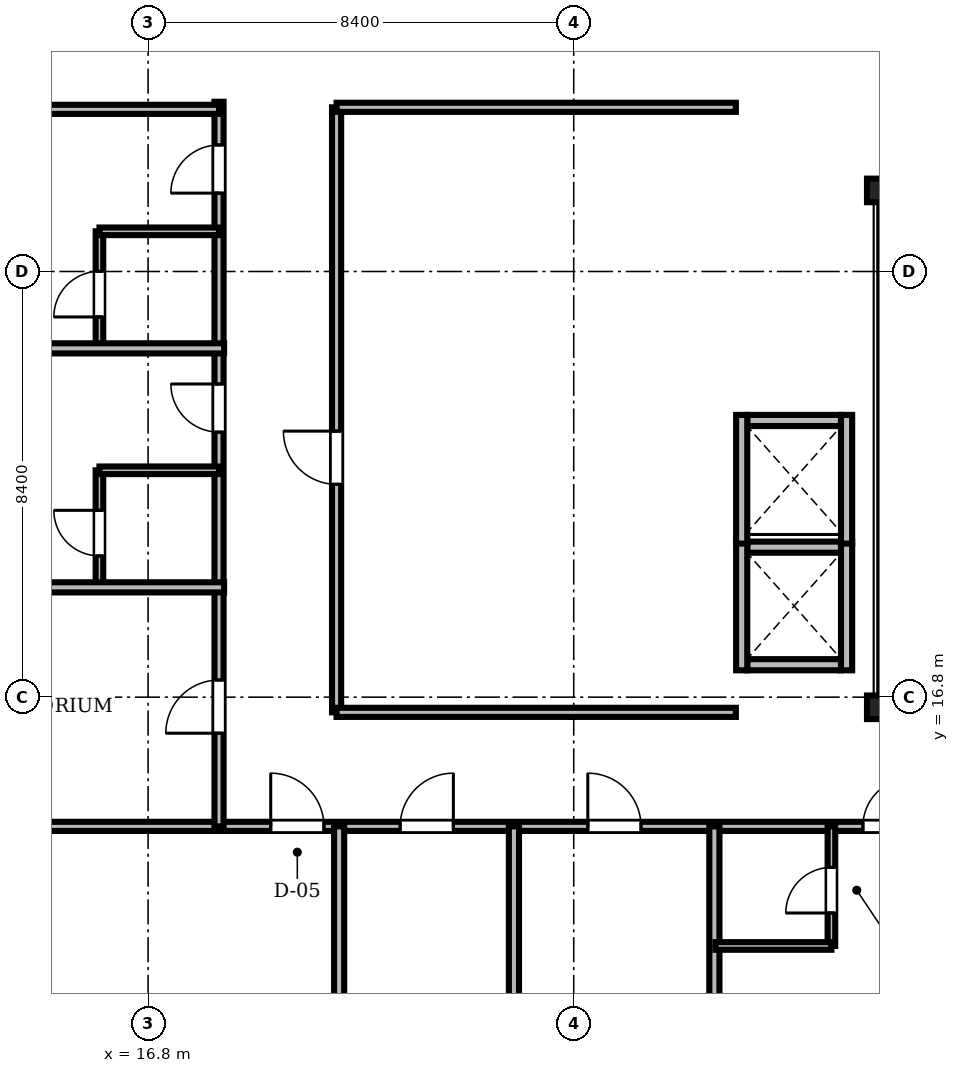
"""IFC4 building model, lengths in metres.
Left out: names, types, materials, properties, quantities, classifications, styles, units other than length and angle.
Written with IfcOpenShell. Run it as: python <this file> out.ifc"""

import sys

from ifc_helpers import new_model, si_unit, direction, frame, frame_2d, origin, origin_2d, place, context, subcontext, project, spatial, rectangle, i_section, extrude, source, transform, mapped, element, fill, save


model = new_model("IFC4")
c1 = context("Model", 3, precision=1e-05, world=origin(), true_north=direction((0.0, 1.0)))
c2 = subcontext(c1, "Body", "Model", "MODEL_VIEW")
j1 = project(units=[si_unit("LENGTHUNIT", "METRE"), si_unit("PLANEANGLEUNIT", "RADIAN")], contexts=[c1])
p1 = place(None, origin())
s1 = spatial("IfcSite", under=j1, at=p1, CompositionType="ELEMENT")
p2 = place(p1, origin())
s2 = spatial("IfcBuilding", under=s1, at=p2, CompositionType="ELEMENT")
p3 = place(p2, frame((0.0, 0.0, 129.8)))
s3 = spatial("IfcBuildingStorey", under=s2, at=p3, CompositionType="ELEMENT", Elevation=129.8)
m1 = source(origin(), c2, "Body", "SweptSolid", [
    extrude(i_section(OverallWidth=0.424, OverallDepth=0.465, WebThickness=0.035, FlangeThickness=0.056, FilletRadius=0.015, at=origin_2d()), origin(), (0.0, 0.0, 1.0), 3.46),
])
for number, where, z_axis, x_axis in (
    (1, (31.2, 16.6, 0.0), (0.0, 0.0, 1.0), (1.0, 0.0, 0.0)),
    (2, (31.2, 26.8, 0.0), (0.0, 0.0, 1.0), (1.0, 0.0, 0.0)),
):
    element("IfcColumn", number, at=place(p3, frame(where, z_axis=z_axis, x_axis=x_axis)), inside=s3, PredefinedType="COLUMN", context=c2, shape_type="MappedRepresentation", body=[
        mapped(m1, transform((0.0, 0.0, 0.0), scale=1.0)),
    ])
m2 = source(origin(), c2, "Body", "SweptSolid", [
    extrude(rectangle(XDim=1.85, YDim=0.22, at=frame_2d((0.925, 0.0))), origin(), (0.0, 0.0, 1.0), 3.46),
])
for number, where, z_axis, x_axis in (
    (3, (28.625, 17.44, 0.0), (0.0, 0.0, 1.0), (1.0, 0.0, 0.0)),
    (4, (28.625, 19.76, 0.0), (0.0, 0.0, 1.0), (1.0, 0.0, 0.0)),
):
    element("IfcWall", number, at=place(p3, frame(where, z_axis=z_axis, x_axis=x_axis)), inside=s3, PredefinedType="SOLIDWALL", context=c2, shape_type="MappedRepresentation", body=[
        mapped(m2, transform((0.0, 0.0, 0.0), scale=1.0)),
    ])
m3 = source(origin(), c2, "Body", "SweptSolid", [
    extrude(rectangle(XDim=2.54, YDim=0.22, at=frame_2d((1.27, 0.0))), origin(), (0.0, 0.0, 1.0), 3.46),
])
for number, where, z_axis, x_axis in (
    (5, (28.515, 17.33, 0.0), (0.0, 0.0, 1.0), (0.0, 1.0, 0.0)),
    (6, (30.585, 17.33, 0.0), (0.0, 0.0, 1.0), (0.0, 1.0, 0.0)),
):
    element("IfcWall", number, at=place(p3, frame(where, z_axis=z_axis, x_axis=x_axis)), inside=s3, PredefinedType="SOLIDWALL", context=c2, shape_type="MappedRepresentation", body=[
        mapped(m3, transform((0.0, 0.0, 0.0), scale=1.0)),
    ])
p4 = place(p3, frame((28.625, 22.26, 0.0), z_axis=(0.0, 0.0, 1.0), x_axis=(1.0, 0.0, 0.0)))
e7 = element("IfcWall", 7, at=p4, inside=s3, PredefinedType="SOLIDWALL", context=c2, shape_type="MappedRepresentation", body=[
    mapped(m2, transform((0.0, 0.0, 0.0), scale=1.0)),
])
for number, where, z_axis, x_axis in (
    (8, (28.515, 19.83, 0.0), (0.0, 0.0, 1.0), (0.0, 1.0, 0.0)),
    (9, (30.585, 19.83, 0.0), (0.0, 0.0, 1.0), (0.0, 1.0, 0.0)),
):
    element("IfcWall", number, at=place(p3, frame(where, z_axis=z_axis, x_axis=x_axis)), inside=s3, PredefinedType="SOLIDWALL", context=c2, shape_type="MappedRepresentation", body=[
        mapped(m3, transform((0.0, 0.0, 0.0), scale=1.0)),
    ])
m4 = source(origin(), c2, "Body", "SweptSolid", [
    extrude(rectangle(XDim=46.156, YDim=0.18, at=frame_2d((23.078, 0.0))), origin(), (0.0, 0.0, 1.0), 2.702),
])
p5 = place(p3, frame((6.922, 14.25, 0.0), z_axis=(0.0, 0.0, 1.0), x_axis=(1.0, 0.0, 0.0)))
e10 = element("IfcWall", 10, at=p5, inside=s3, PredefinedType="PARTITIONING", context=c2, shape_type="MappedRepresentation", body=[
    mapped(m4, transform((0.0, 0.0, 0.0), scale=1.0)),
])
m5 = source(origin(), c2, "Body", "SweptSolid", [
    extrude(rectangle(XDim=1.05, YDim=2.2, at=frame_2d((0.525, 1.1))), frame((0.0, 0.1, 0.0), z_axis=(0.0, -1.0, 0.0), x_axis=(1.0, 0.0, 0.0)), (0.0, 0.0, 1.0), 0.2),
])
p6 = place(p5, frame((12.298, 0.0, 0.0)))
e11 = element("IfcOpeningElement", 11, at=p6, cuts=e10, PredefinedType="OPENING", context=c2, shape_type="MappedRepresentation", body=[
    mapped(m5, transform((0.0, 0.0, 0.0), scale=1.0)),
])
p7 = place(p5, frame((14.853, 0.0, 0.0)))
e12 = element("IfcOpeningElement", 12, at=p7, cuts=e10, PredefinedType="OPENING", context=c2, shape_type="MappedRepresentation", body=[
    mapped(m5, transform((0.0, 0.0, 0.0), scale=1.0)),
])
p8 = place(p5, frame((18.556, 0.0, 0.0)))
e13 = element("IfcOpeningElement", 13, at=p8, cuts=e10, PredefinedType="OPENING", context=c2, shape_type="MappedRepresentation", body=[
    mapped(m5, transform((0.0, 0.0, 0.0), scale=1.0)),
])
m6 = source(origin(), c2, "Body", "SweptSolid", [
    extrude(rectangle(XDim=0.95, YDim=2.15, at=frame_2d((0.475, 1.075))), frame((0.0, 0.1, 0.0), z_axis=(0.0, -1.0, 0.0), x_axis=(1.0, 0.0, 0.0)), (0.0, 0.0, 1.0), 0.2),
])
p9 = place(p5, frame((23.985, 0.0, 0.0)))
e14 = element("IfcOpeningElement", 14, at=p9, cuts=e10, PredefinedType="OPENING", context=c2, shape_type="MappedRepresentation", body=[
    mapped(m6, transform((0.0, 0.0, 0.0), scale=1.0)),
])
p10 = place(p5, frame((27.213, 0.0, 0.0)))
e15 = element("IfcOpeningElement", 15, at=p10, cuts=e10, PredefinedType="OPENING", context=c2, shape_type="MappedRepresentation", body=[
    mapped(m5, transform((0.0, 0.0, 0.0), scale=1.0)),
])
p11 = place(p5, frame((31.666, 0.0, 0.0)))
e16 = element("IfcOpeningElement", 16, at=p11, cuts=e10, PredefinedType="OPENING", context=c2, shape_type="MappedRepresentation", body=[
    mapped(m5, transform((0.0, 0.0, 0.0), scale=1.0)),
])
p12 = place(p5, frame((36.869, 0.0, 0.0)))
e17 = element("IfcOpeningElement", 17, at=p12, cuts=e10, PredefinedType="OPENING", context=c2, shape_type="MappedRepresentation", body=[
    mapped(m5, transform((0.0, 0.0, 0.0), scale=1.0)),
])
p13 = place(p5, frame((41.828, 0.0, 0.0)))
e18 = element("IfcOpeningElement", 18, at=p13, cuts=e10, PredefinedType="OPENING", context=c2, shape_type="MappedRepresentation", body=[
    mapped(m5, transform((0.0, 0.0, 0.0), scale=1.0)),
])
m7 = source(origin(), c2, "Body", "SweptSolid", [
    extrude(rectangle(XDim=14.3, YDim=0.18, at=frame_2d((7.15, 0.0))), origin(), (0.0, 0.0, 1.0), 2.852),
])
p14 = place(p3, frame((18.2, 14.25, 0.0), z_axis=(0.0, 0.0, 1.0), x_axis=(0.0, 1.0, 0.0)))
e19 = element("IfcWall", 19, at=p14, inside=s3, PredefinedType="PARTITIONING", context=c2, shape_type="MappedRepresentation", body=[
    mapped(m7, transform((0.0, 0.0, 0.0), scale=1.0)),
])
p15 = place(p14, frame((1.838, 0.0, 0.0)))
e20 = element("IfcOpeningElement", 20, at=p15, cuts=e19, PredefinedType="OPENING", context=c2, shape_type="MappedRepresentation", body=[
    mapped(m5, transform((0.0, 0.0, 0.0), scale=1.0)),
])
p16 = place(p14, frame((7.78, 0.0, 0.0)))
e21 = element("IfcOpeningElement", 21, at=p16, cuts=e19, PredefinedType="OPENING", context=c2, shape_type="MappedRepresentation", body=[
    mapped(m6, transform((0.0, 0.0, 0.0), scale=1.0)),
])
p17 = place(p14, frame((12.497, 0.0, 0.0)))
e22 = element("IfcOpeningElement", 22, at=p17, cuts=e19, PredefinedType="OPENING", context=c2, shape_type="MappedRepresentation", body=[
    mapped(m6, transform((0.0, 0.0, 0.0), scale=1.0)),
])
m8 = source(origin(), c2, "Body", "SweptSolid", [
    extrude(rectangle(XDim=11.94, YDim=0.18, at=frame_2d((5.97, 0.0))), origin(), (0.0, 0.0, 1.0), 2.852),
])
p18 = place(p3, frame((20.52, 16.5, 0.0), z_axis=(0.0, 0.0, 1.0), x_axis=(0.0, 1.0, 0.0)))
e23 = element("IfcWall", 23, at=p18, inside=s3, PredefinedType="PARTITIONING", context=c2, shape_type="MappedRepresentation", body=[
    mapped(m8, transform((0.0, 0.0, 0.0), scale=1.0)),
])
p19 = place(p18, frame((4.5, 0.0, 0.0)))
e24 = element("IfcOpeningElement", 24, at=p19, cuts=e23, PredefinedType="OPENING", context=c2, shape_type="MappedRepresentation", body=[
    mapped(m5, transform((0.0, 0.0, 0.0), scale=1.0)),
])
m9 = source(origin(), c2, "Body", "SweptSolid", [
    extrude(rectangle(XDim=2.36, YDim=0.15, at=frame_2d((1.18, 0.0))), origin(), (0.0, 0.0, 1.0), 2.852),
])
p20 = place(p3, frame((30.286, 11.89, 0.0), z_axis=(0.0, 0.0, 1.0), x_axis=(0.0, 1.0, 0.0)))
e25 = element("IfcWall", 25, at=p20, inside=s3, PredefinedType="PARTITIONING", context=c2, shape_type="MappedRepresentation", body=[
    mapped(m9, transform((0.0, 0.0, 0.0), scale=1.0)),
])
m10 = source(origin(), c2, "Body", "SweptSolid", [
    extrude(rectangle(XDim=0.9, YDim=2.1, at=frame_2d((0.45, 1.05))), frame((0.0, 0.085, 0.0), z_axis=(0.0, -1.0, 0.0), x_axis=(1.0, 0.0, 0.0)), (0.0, 0.0, 1.0), 0.17),
])
p21 = place(p20, frame((0.65, 0.0, 0.0)))
e26 = element("IfcOpeningElement", 26, at=p21, cuts=e25, PredefinedType="OPENING", context=c2, shape_type="MappedRepresentation", body=[
    mapped(m10, transform((0.0, 0.0, 0.0), scale=1.0)),
])
m11 = source(origin(), c2, "Body", "SweptSolid", [
    extrude(rectangle(XDim=2.29, YDim=0.15, at=frame_2d((1.145, 0.0))), origin(), (0.0, 0.0, 1.0), 2.852),
])
p22 = place(p3, frame((15.84, 18.987, 0.0), z_axis=(0.0, 0.0, 1.0), x_axis=(0.0, 1.0, 0.0)))
e27 = element("IfcWall", 27, at=p22, inside=s3, PredefinedType="PARTITIONING", context=c2, shape_type="MappedRepresentation", body=[
    mapped(m11, transform((0.0, 0.0, 0.0), scale=1.0)),
])
p23 = place(p22, frame((0.6, 0.0, 0.0)))
e28 = element("IfcOpeningElement", 28, at=p23, cuts=e27, PredefinedType="OPENING", context=c2, shape_type="MappedRepresentation", body=[
    mapped(m10, transform((0.0, 0.0, 0.0), scale=1.0)),
])
m12 = source(origin(), c2, "Body", "SweptSolid", [
    extrude(rectangle(XDim=2.29, YDim=0.15, at=frame_2d((1.145, 0.0))), origin(), (0.0, 0.0, 1.0), 3.46),
])
p24 = place(p3, frame((15.84, 23.703, 0.0), z_axis=(0.0, 0.0, 1.0), x_axis=(0.0, 1.0, 0.0)))
e29 = element("IfcWall", 29, at=p24, inside=s3, PredefinedType="PARTITIONING", context=c2, shape_type="MappedRepresentation", body=[
    mapped(m12, transform((0.0, 0.0, 0.0), scale=1.0)),
])
p25 = place(p24, frame((0.6, 0.0, 0.0)))
e30 = element("IfcOpeningElement", 30, at=p25, cuts=e29, PredefinedType="OPENING", context=c2, shape_type="MappedRepresentation", body=[
    mapped(m10, transform((0.0, 0.0, 0.0), scale=1.0)),
])
m13 = source(origin(), c2, "Body", "SweptSolid", [
    extrude(rectangle(XDim=12.128, YDim=0.2, at=frame_2d((6.064, 0.0))), origin(), (0.0, 0.0, 1.0), 2.702),
])
for number, where, z_axis, x_axis in (
    (31, (20.57, 2.122, 0.0), (0.0, 0.0, 1.0), (0.0, 1.0, 0.0)),
    (32, (24.02, 2.122, 0.0), (0.0, 0.0, 1.0), (0.0, 1.0, 0.0)),
):
    element("IfcWall", number, at=place(p3, frame(where, z_axis=z_axis, x_axis=x_axis)), inside=s3, PredefinedType="PARTITIONING", context=c2, shape_type="MappedRepresentation", body=[
        mapped(m13, transform((0.0, 0.0, 0.0), scale=1.0)),
    ])
m14 = source(origin(), c2, "Body", "SweptSolid", [
    extrude(rectangle(XDim=12.32, YDim=0.2, at=frame_2d((6.16, 0.0))), origin(), (0.0, 0.0, 1.0), 2.702),
])
p26 = place(p3, frame((27.976, 1.93, 0.0), z_axis=(0.0, 0.0, 1.0), x_axis=(0.0, 1.0, 0.0)))
e33 = element("IfcWall", 33, at=p26, inside=s3, PredefinedType="PARTITIONING", context=c2, shape_type="MappedRepresentation", body=[
    mapped(m14, transform((0.0, 0.0, 0.0), scale=1.0)),
])
m15 = source(origin(), c2, "Body", "SweptSolid", [
    extrude(rectangle(XDim=11.378, YDim=0.2, at=frame_2d((5.689, 0.0))), origin(), (0.0, 0.0, 1.0), 2.702),
])
p27 = place(p3, frame((6.922, 18.967, 0.0), z_axis=(0.0, 0.0, 1.0), x_axis=(1.0, 0.0, 0.0)))
e34 = element("IfcWall", 34, at=p27, inside=s3, PredefinedType="PARTITIONING", context=c2, shape_type="MappedRepresentation", body=[
    mapped(m15, transform((0.0, 0.0, 0.0), scale=1.0)),
])
m16 = source(origin(), c2, "Body", "SweptSolid", [
    extrude(rectangle(XDim=11.57, YDim=0.2, at=frame_2d((5.785, 0.0))), origin(), (0.0, 0.0, 1.0), 2.702),
])
p28 = place(p3, frame((6.73, 23.683, 0.0), z_axis=(0.0, 0.0, 1.0), x_axis=(1.0, 0.0, 0.0)))
e35 = element("IfcWall", 35, at=p28, inside=s3, PredefinedType="PARTITIONING", context=c2, shape_type="MappedRepresentation", body=[
    mapped(m16, transform((0.0, 0.0, 0.0), scale=1.0)),
])
m17 = source(origin(), c2, "Body", "SweptSolid", [
    extrude(rectangle(XDim=11.47, YDim=0.18, at=frame_2d((5.735, 0.0))), origin(), (0.0, 0.0, 1.0), 2.702),
])
p29 = place(p3, frame((6.73, 28.4, 0.0), z_axis=(0.0, 0.0, 1.0), x_axis=(1.0, 0.0, 0.0)))
e36 = element("IfcWall", 36, at=p29, inside=s3, PredefinedType="PARTITIONING", context=c2, shape_type="MappedRepresentation", body=[
    mapped(m17, transform((0.0, 0.0, 0.0), scale=1.0)),
])
m18 = source(origin(), c2, "Body", "SweptSolid", [
    extrude(rectangle(XDim=7.88, YDim=0.18, at=frame_2d((3.94, 0.0))), origin(), (0.0, 0.0, 1.0), 3.46),
])
for number, where, z_axis, x_axis in (
    (37, (20.52, 16.5, 0.0), (0.0, 0.0, 1.0), (1.0, 0.0, 0.0)),
    (38, (20.52, 28.44, 0.0), (0.0, 0.0, 1.0), (1.0, 0.0, 0.0)),
):
    element("IfcWall", number, at=place(p3, frame(where, z_axis=z_axis, x_axis=x_axis)), inside=s3, PredefinedType="PARTITIONING", context=c2, shape_type="MappedRepresentation", body=[
        mapped(m18, transform((0.0, 0.0, 0.0), scale=1.0)),
    ])
m19 = source(origin(), c2, "Body", "SweptSolid", [
    extrude(rectangle(XDim=2.36, YDim=0.15, at=frame_2d((1.18, 0.0))), origin(), (0.0, 0.0, 1.0), 3.46),
])
for number, where, z_axis, x_axis in (
    (39, (15.84, 21.277, 0.0), (0.0, 0.0, 1.0), (1.0, 0.0, 0.0)),
    (40, (15.84, 25.993, 0.0), (0.0, 0.0, 1.0), (1.0, 0.0, 0.0)),
):
    element("IfcWall", number, at=place(p3, frame(where, z_axis=z_axis, x_axis=x_axis)), inside=s3, PredefinedType="PARTITIONING", context=c2, shape_type="MappedRepresentation", body=[
        mapped(m19, transform((0.0, 0.0, 0.0), scale=1.0)),
    ])
m20 = source(origin(), c2, "Body", "SweptSolid", [
    extrude(rectangle(XDim=2.29, YDim=0.15, at=frame_2d((1.145, 0.0))), origin(), (0.0, 0.0, 1.0), 2.852),
])
p30 = place(p3, frame((27.996, 11.89, 0.0), z_axis=(0.0, 0.0, 1.0), x_axis=(1.0, 0.0, 0.0)))
e41 = element("IfcWall", 41, at=p30, inside=s3, PredefinedType="PARTITIONING", context=c2, shape_type="MappedRepresentation", body=[
    mapped(m20, transform((0.0, 0.0, 0.0), scale=1.0)),
])
m21 = source(origin(), c2, "Body", "SweptSolid", [
    extrude(rectangle(XDim=1.05, YDim=2.2, at=frame_2d((0.525, 1.1))), frame((0.0, 0.025, 0.0), z_axis=(0.0, -1.0, 0.0), x_axis=(1.0, 0.0, 0.0)), (0.0, 0.0, 1.0), 0.05),
])
p31 = place(p6, origin())
e42 = element("IfcDoor", 42, at=p31, inside=s3, OperationType="SINGLE_SWING_LEFT", PredefinedType="DOOR", context=c2, shape_type="MappedRepresentation", body=[
    mapped(m21, transform((0.0, 0.0, 0.0), scale=1.0)),
])
fill(e11, e42)
p32 = place(p7, origin())
e43 = element("IfcDoor", 43, at=p32, inside=s3, OperationType="SINGLE_SWING_RIGHT", PredefinedType="DOOR", context=c2, shape_type="MappedRepresentation", body=[
    mapped(m21, transform((0.0, 0.0, 0.0), scale=1.0)),
])
fill(e12, e43)
p33 = place(p8, origin())
e44 = element("IfcDoor", 44, at=p33, inside=s3, OperationType="SINGLE_SWING_LEFT", PredefinedType="DOOR", context=c2, shape_type="MappedRepresentation", body=[
    mapped(m21, transform((0.0, 0.0, 0.0), scale=1.0)),
])
fill(e13, e44)
m22 = source(origin(), c2, "Body", "SweptSolid", [
    extrude(rectangle(XDim=0.95, YDim=2.15, at=frame_2d((0.475, 1.075))), frame((0.0, 0.025, 0.0), z_axis=(0.0, -1.0, 0.0), x_axis=(1.0, 0.0, 0.0)), (0.0, 0.0, 1.0), 0.05),
])
p34 = place(p9, origin())
e45 = element("IfcDoor", 45, at=p34, inside=s3, OperationType="SINGLE_SWING_RIGHT", PredefinedType="DOOR", context=c2, shape_type="MappedRepresentation", body=[
    mapped(m22, transform((0.0, 0.0, 0.0), scale=1.0)),
])
fill(e14, e45)
p35 = place(p15, origin())
e46 = element("IfcDoor", 46, at=p35, inside=s3, OperationType="SINGLE_SWING_LEFT", PredefinedType="DOOR", context=c2, shape_type="MappedRepresentation", body=[
    mapped(m21, transform((0.0, 0.0, 0.0), scale=1.0)),
])
fill(e20, e46)
p36 = place(p16, origin())
e47 = element("IfcDoor", 47, at=p36, inside=s3, OperationType="SINGLE_SWING_RIGHT", PredefinedType="DOOR", context=c2, shape_type="MappedRepresentation", body=[
    mapped(m22, transform((0.0, 0.0, 0.0), scale=1.0)),
])
fill(e21, e47)
p37 = place(p17, origin())
e48 = element("IfcDoor", 48, at=p37, inside=s3, OperationType="SINGLE_SWING_LEFT", PredefinedType="DOOR", context=c2, shape_type="MappedRepresentation", body=[
    mapped(m22, transform((0.0, 0.0, 0.0), scale=1.0)),
])
fill(e22, e48)
p38 = place(p19, origin())
e49 = element("IfcDoor", 49, at=p38, inside=s3, OperationType="SINGLE_SWING_RIGHT", PredefinedType="DOOR", context=c2, shape_type="MappedRepresentation", body=[
    mapped(m21, transform((0.0, 0.0, 0.0), scale=1.0)),
])
fill(e24, e49)
m23 = source(origin(), c2, "Body", "SweptSolid", [
    extrude(rectangle(XDim=0.9, YDim=2.1, at=frame_2d((0.45, 1.05))), frame((0.0, 0.025, 0.0), z_axis=(0.0, -1.0, 0.0), x_axis=(1.0, 0.0, 0.0)), (0.0, 0.0, 1.0), 0.05),
])
p39 = place(p21, origin())
e50 = element("IfcDoor", 50, at=p39, inside=s3, OperationType="SINGLE_SWING_LEFT", PredefinedType="DOOR", context=c2, shape_type="MappedRepresentation", body=[
    mapped(m23, transform((0.0, 0.0, 0.0), scale=1.0)),
])
fill(e26, e50)
p40 = place(p23, origin())
e51 = element("IfcDoor", 51, at=p40, inside=s3, OperationType="SINGLE_SWING_RIGHT", PredefinedType="DOOR", context=c2, shape_type="MappedRepresentation", body=[
    mapped(m23, transform((0.0, 0.0, 0.0), scale=1.0)),
])
fill(e28, e51)
p41 = place(p25, origin())
e52 = element("IfcDoor", 52, at=p41, inside=s3, OperationType="SINGLE_SWING_LEFT", PredefinedType="DOOR", context=c2, shape_type="MappedRepresentation", body=[
    mapped(m23, transform((0.0, 0.0, 0.0), scale=1.0)),
])
fill(e30, e52)
save(model, sys.argv[1])
